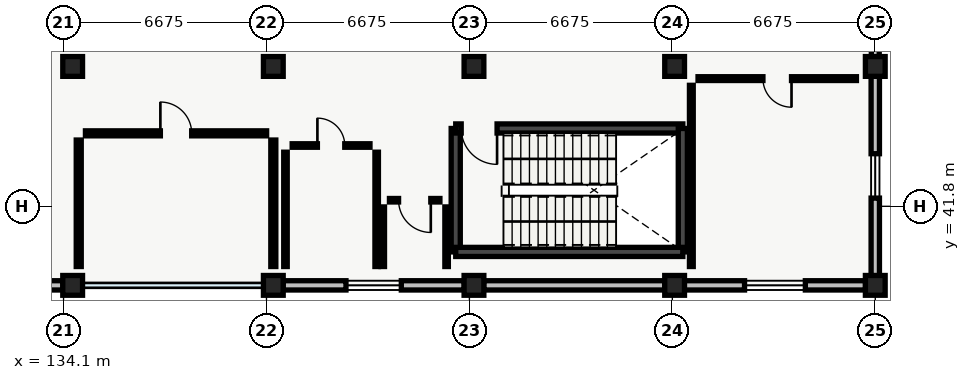
"""IFC4 building model, lengths in metres.
Left out: names, types, materials, properties, quantities, classifications, styles, units other than length and angle.
Written with IfcOpenShell. Run it as: python <this file> out.ifc"""

import sys

from ifc_helpers import new_model, si_unit, direction, frame, frame_2d, origin, origin_2d, place, context, subcontext, project, spatial, rectangle, extrude, element, fill, save


model = new_model("IFC4")
c1 = context("Model", 3, precision=1e-05, world=origin(), true_north=direction((0.0, 1.0)))
c2 = subcontext(c1, "Body", "Model", "MODEL_VIEW")
j1 = project(units=[si_unit("LENGTHUNIT", "METRE"), si_unit("PLANEANGLEUNIT", "RADIAN")], contexts=[c1])
p1 = place(None, origin())
s1 = spatial("IfcSite", under=j1, at=p1, CompositionType="ELEMENT")
p2 = place(p1, origin())
s2 = spatial("IfcBuilding", under=s1, at=p2, CompositionType="ELEMENT")
p3 = place(p2, frame((0.0, 0.0, 14.1)))
s3 = spatial("IfcBuildingStorey", under=s2, at=p3, CompositionType="ELEMENT", Elevation=14.1)
for number, where, z_axis, x_axis in (
    (1, (134.4, 39.2, 0.0), (0.0, 0.0, 1.0), (1.0, 0.0, 0.0)),
    (2, (134.4, 46.4, 0.0), (0.0, 0.0, 1.0), (1.0, 0.0, 0.0)),
    (3, (141.0, 39.2, 0.0), (0.0, 0.0, 1.0), (1.0, 0.0, 0.0)),
    (4, (141.0, 46.4, 0.0), (0.0, 0.0, 1.0), (1.0, 0.0, 0.0)),
    (5, (147.6, 39.2, 0.0), (0.0, 0.0, 1.0), (1.0, 0.0, 0.0)),
    (6, (147.6, 46.4, 0.0), (0.0, 0.0, 1.0), (1.0, 0.0, 0.0)),
    (7, (154.2, 39.2, 0.0), (0.0, 0.0, 1.0), (1.0, 0.0, 0.0)),
    (8, (154.2, 46.4, 0.0), (0.0, 0.0, 1.0), (1.0, 0.0, 0.0)),
    (9, (160.8, 39.2, 0.0), (0.0, 0.0, 1.0), (1.0, 0.0, 0.0)),
    (10, (160.8, 46.4, 0.0), (0.0, 0.0, 1.0), (1.0, 0.0, 0.0)),
):
    element("IfcColumn", number, at=place(p3, frame(where, z_axis=z_axis, x_axis=x_axis)), inside=s3, PredefinedType="COLUMN", context=c2, shape_type="SweptSolid", body=[
        extrude(rectangle(XDim=0.65, YDim=0.65, at=origin_2d()), origin(), (0.0, 0.0, 1.0), 4.29),
    ])
p4 = place(p3, frame((160.8, 53.28, 0.0), z_axis=(0.0, 0.0, 1.0), x_axis=(0.0, -1.0, 0.0)))
e11 = element("IfcWall", 11, at=p4, inside=s3, PredefinedType="STANDARD", context=c2, shape_type="SweptSolid", body=[
    extrude(rectangle(XDim=6.56, YDim=0.26, at=frame_2d((3.28, 0.0))), origin(), (0.0, 0.0, 1.0), 3.775),
])
p5 = place(p4, frame((2.505, 0.0, 0.95)))
e12 = element("IfcOpeningElement", 12, at=p5, cuts=e11, PredefinedType="OPENING", context=c2, shape_type="SweptSolid", body=[
    extrude(rectangle(XDim=1.55, YDim=1.46, at=frame_2d((0.775, 0.73))), frame((0.0, 0.13, 0.0), z_axis=(0.0, -1.0, 0.0), x_axis=(1.0, 0.0, 0.0)), (0.0, 0.0, 1.0), 0.26),
])
p6 = place(p3, frame((160.8, 46.08, 0.0), z_axis=(0.0, 0.0, 1.0), x_axis=(0.0, -1.0, 0.0)))
e13 = element("IfcWall", 13, at=p6, inside=s3, PredefinedType="STANDARD", context=c2, shape_type="SweptSolid", body=[
    extrude(rectangle(XDim=6.56, YDim=0.275, at=frame_2d((3.28, 0.0))), origin(), (0.0, 0.0, 1.0), 3.775),
])
p7 = place(p6, frame((2.55, 0.0, 0.95)))
e14 = element("IfcOpeningElement", 14, at=p7, cuts=e13, PredefinedType="OPENING", context=c2, shape_type="SweptSolid", body=[
    extrude(rectangle(XDim=1.46, YDim=1.44, at=frame_2d((0.73, 0.72))), frame((0.0, 0.137, 0.0), z_axis=(0.0, -1.0, 0.0), x_axis=(1.0, 0.0, 0.0)), (0.0, 0.0, 1.0), 0.275),
])
p8 = place(p3, frame((160.48, 39.2, 0.0), z_axis=(0.0, 0.0, 1.0), x_axis=(-1.0, 0.0, 0.0)))
e15 = element("IfcWall", 15, at=p8, inside=s3, PredefinedType="STANDARD", context=c2, shape_type="SweptSolid", body=[
    extrude(rectangle(XDim=5.96, YDim=0.305, at=frame_2d((2.98, 0.0))), origin(), (0.0, 0.0, 1.0), 3.775),
])
p9 = place(p8, frame((1.98, 0.0, 0.95)))
e16 = element("IfcOpeningElement", 16, at=p9, cuts=e15, PredefinedType="OPENING", context=c2, shape_type="SweptSolid", body=[
    extrude(rectangle(XDim=2.0, YDim=1.42, at=frame_2d((1.0, 0.71))), frame((0.0, 0.152, 0.0), z_axis=(0.0, -1.0, 0.0), x_axis=(1.0, 0.0, 0.0)), (0.0, 0.0, 1.0), 0.305),
])
p10 = place(p3, frame((153.88, 39.2, 0.0), z_axis=(0.0, 0.0, 1.0), x_axis=(-1.0, 0.0, 0.0)))
e17 = element("IfcWall", 17, at=p10, inside=s3, PredefinedType="STANDARD", context=c2, shape_type="SweptSolid", body=[
    extrude(rectangle(XDim=5.96, YDim=0.305, at=frame_2d((2.98, 0.0))), origin(), (0.0, 0.0, 1.0), 3.775),
])
p11 = place(p3, frame((147.28, 39.2, 0.0), z_axis=(0.0, 0.0, 1.0), x_axis=(-1.0, 0.0, 0.0)))
e18 = element("IfcWall", 18, at=p11, inside=s3, PredefinedType="STANDARD", context=c2, shape_type="SweptSolid", body=[
    extrude(rectangle(XDim=5.96, YDim=0.305, at=frame_2d((2.98, 0.0))), origin(), (0.0, 0.0, 1.0), 3.775),
])
p12 = place(p11, frame((2.07, 0.0, 0.95)))
e19 = element("IfcOpeningElement", 19, at=p12, cuts=e18, PredefinedType="OPENING", context=c2, shape_type="SweptSolid", body=[
    extrude(rectangle(XDim=1.82, YDim=1.38, at=frame_2d((0.91, 0.69))), frame((0.0, 0.152, 0.0), z_axis=(0.0, -1.0, 0.0), x_axis=(1.0, 0.0, 0.0)), (0.0, 0.0, 1.0), 0.305),
])
p13 = place(p3, frame((134.08, 39.2, 0.0), z_axis=(0.0, 0.0, 1.0), x_axis=(-1.0, 0.0, 0.0)))
e20 = element("IfcWall", 20, at=p13, inside=s3, PredefinedType="STANDARD", context=c2, shape_type="SweptSolid", body=[
    extrude(rectangle(XDim=5.96, YDim=0.305, at=frame_2d((2.98, 0.0))), origin(), (0.0, 0.0, 1.0), 3.775),
])
p14 = place(p13, frame((2.16, 0.0, 0.95)))
e21 = element("IfcOpeningElement", 21, at=p14, cuts=e20, PredefinedType="OPENING", context=c2, shape_type="SweptSolid", body=[
    extrude(rectangle(XDim=1.64, YDim=1.48, at=frame_2d((0.82, 0.74))), frame((0.0, 0.152, 0.0), z_axis=(0.0, -1.0, 0.0), x_axis=(1.0, 0.0, 0.0)), (0.0, 0.0, 1.0), 0.305),
])
p15 = place(p3, frame((147.0, 40.3, 0.0), z_axis=(0.0, 0.0, 1.0), x_axis=(0.0, 1.0, 0.0)))
e22 = element("IfcWall", 22, at=p15, inside=s3, PredefinedType="SHEAR", context=c2, shape_type="SweptSolid", body=[
    extrude(rectangle(XDim=4.06, YDim=0.3, at=frame_2d((2.03, 0.0))), origin(), (0.0, 0.0, 1.0), 4.28),
])
p16 = place(p3, frame((147.0, 44.36, 0.0), z_axis=(0.0, 0.0, 1.0), x_axis=(1.0, 0.0, 0.0)))
e23 = element("IfcWall", 23, at=p16, inside=s3, PredefinedType="SHEAR", context=c2, shape_type="SweptSolid", body=[
    extrude(rectangle(XDim=7.47, YDim=0.3, at=frame_2d((3.735, 0.0))), origin(), (0.0, 0.0, 1.0), 4.28),
])
p17 = place(p16, frame((0.18, 0.0, 0.0)))
e24 = element("IfcOpeningElement", 24, at=p17, cuts=e23, PredefinedType="OPENING", context=c2, shape_type="SweptSolid", body=[
    extrude(rectangle(XDim=1.18, YDim=2.15, at=frame_2d((0.59, 1.075))), frame((0.0, 0.15, 0.0), z_axis=(0.0, -1.0, 0.0), x_axis=(1.0, 0.0, 0.0)), (0.0, 0.0, 1.0), 0.3),
])
p18 = place(p3, frame((154.47, 44.36, 0.0), z_axis=(0.0, 0.0, 1.0), x_axis=(0.0, -1.0, 0.0)))
e25 = element("IfcWall", 25, at=p18, inside=s3, PredefinedType="SHEAR", context=c2, shape_type="SweptSolid", body=[
    extrude(rectangle(XDim=4.06, YDim=0.3, at=frame_2d((2.03, 0.0))), origin(), (0.0, 0.0, 1.0), 4.28),
])
p19 = place(p3, frame((154.47, 40.3, 0.0), z_axis=(0.0, 0.0, 1.0), x_axis=(-1.0, 0.0, 0.0)))
e26 = element("IfcWall", 26, at=p19, inside=s3, PredefinedType="SHEAR", context=c2, shape_type="SweptSolid", body=[
    extrude(rectangle(XDim=7.47, YDim=0.3, at=frame_2d((3.735, 0.0))), origin(), (0.0, 0.0, 1.0), 4.28),
])
p20 = place(p3, frame((144.4, 39.82, 0.0), z_axis=(0.0, 0.0, 1.0), x_axis=(0.0, 1.0, 0.0)))
e27 = element("IfcWall", 27, at=p20, inside=s3, PredefinedType="PARTITIONING", context=c2, shape_type="SweptSolid", body=[
    extrude(rectangle(XDim=3.76, YDim=0.115, at=frame_2d((1.88, 0.0))), origin(), (0.0, 0.0, 1.0), 3.95),
])
p21 = place(p3, frame((144.18, 43.8, 0.0), z_axis=(0.0, 0.0, 1.0), x_axis=(-1.0, 0.0, 0.0)))
e28 = element("IfcWall", 28, at=p21, inside=s3, PredefinedType="PARTITIONING", context=c2, shape_type="SweptSolid", body=[
    extrude(rectangle(XDim=2.56, YDim=0.115, at=frame_2d((1.28, 0.0))), origin(), (0.0, 0.0, 1.0), 3.95),
])
p22 = place(p21, frame((0.83, 0.0, 0.0)))
e29 = element("IfcOpeningElement", 29, at=p22, cuts=e28, PredefinedType="OPENING", context=c2, shape_type="SweptSolid", body=[
    extrude(rectangle(XDim=0.9, YDim=2.1, at=frame_2d((0.45, 1.05))), frame((0.0, 0.058, 0.0), z_axis=(0.0, -1.0, 0.0), x_axis=(1.0, 0.0, 0.0)), (0.0, 0.0, 1.0), 0.115),
])
p23 = place(p3, frame((141.4, 43.58, 0.0), z_axis=(0.0, 0.0, 1.0), x_axis=(0.0, -1.0, 0.0)))
e30 = element("IfcWall", 30, at=p23, inside=s3, PredefinedType="PARTITIONING", context=c2, shape_type="SweptSolid", body=[
    extrude(rectangle(XDim=3.76, YDim=0.115, at=frame_2d((1.88, 0.0))), origin(), (0.0, 0.0, 1.0), 3.95),
])
p24 = place(p3, frame((146.7, 39.82, 0.0), z_axis=(0.0, 0.0, 1.0), x_axis=(0.0, 1.0, 0.0)))
e31 = element("IfcWall", 31, at=p24, inside=s3, PredefinedType="PARTITIONING", context=c2, shape_type="SweptSolid", body=[
    extrude(rectangle(XDim=1.96, YDim=0.115, at=frame_2d((0.98, 0.0))), origin(), (0.0, 0.0, 1.0), 3.95),
])
p25 = place(p3, frame((146.48, 42.0, 0.0), z_axis=(0.0, 0.0, 1.0), x_axis=(-1.0, 0.0, 0.0)))
e32 = element("IfcWall", 32, at=p25, inside=s3, PredefinedType="PARTITIONING", context=c2, shape_type="SweptSolid", body=[
    extrude(rectangle(XDim=1.66, YDim=0.115, at=frame_2d((0.83, 0.0))), origin(), (0.0, 0.0, 1.0), 3.95),
])
p26 = place(p25, frame((0.3, 0.0, 0.0)))
e33 = element("IfcOpeningElement", 33, at=p26, cuts=e32, PredefinedType="OPENING", context=c2, shape_type="SweptSolid", body=[
    extrude(rectangle(XDim=1.06, YDim=2.12, at=frame_2d((0.53, 1.06))), frame((0.0, 0.058, 0.0), z_axis=(0.0, -1.0, 0.0), x_axis=(1.0, 0.0, 0.0)), (0.0, 0.0, 1.0), 0.115),
])
p27 = place(p3, frame((144.6, 41.78, 0.0), z_axis=(0.0, 0.0, 1.0), x_axis=(0.0, -1.0, 0.0)))
e34 = element("IfcWall", 34, at=p27, inside=s3, PredefinedType="PARTITIONING", context=c2, shape_type="SweptSolid", body=[
    extrude(rectangle(XDim=1.96, YDim=0.115, at=frame_2d((0.98, 0.0))), origin(), (0.0, 0.0, 1.0), 3.95),
])
p28 = place(p3, frame((141.0, 39.82, 0.0), z_axis=(0.0, 0.0, 1.0), x_axis=(0.0, 1.0, 0.0)))
e35 = element("IfcWall", 35, at=p28, inside=s3, PredefinedType="PARTITIONING", context=c2, shape_type="SweptSolid", body=[
    extrude(rectangle(XDim=4.16, YDim=0.165, at=frame_2d((2.08, 0.0))), origin(), (0.0, 0.0, 1.0), 3.675),
])
p29 = place(p3, frame((140.78, 44.2, 0.0), z_axis=(0.0, 0.0, 1.0), x_axis=(-1.0, 0.0, 0.0)))
e36 = element("IfcWall", 36, at=p29, inside=s3, PredefinedType="PARTITIONING", context=c2, shape_type="SweptSolid", body=[
    extrude(rectangle(XDim=5.96, YDim=0.165, at=frame_2d((2.98, 0.0))), origin(), (0.0, 0.0, 1.0), 3.875),
])
p30 = place(p29, frame((2.465, 0.0, 0.0)))
e37 = element("IfcOpeningElement", 37, at=p30, cuts=e36, PredefinedType="OPENING", context=c2, shape_type="SweptSolid", body=[
    extrude(rectangle(XDim=1.03, YDim=2.16, at=frame_2d((0.515, 1.08))), frame((0.0, 0.083, 0.0), z_axis=(0.0, -1.0, 0.0), x_axis=(1.0, 0.0, 0.0)), (0.0, 0.0, 1.0), 0.165),
])
p31 = place(p3, frame((134.6, 43.98, 0.0), z_axis=(0.0, 0.0, 1.0), x_axis=(0.0, -1.0, 0.0)))
e38 = element("IfcWall", 38, at=p31, inside=s3, PredefinedType="PARTITIONING", context=c2, shape_type="SweptSolid", body=[
    extrude(rectangle(XDim=4.16, YDim=0.165, at=frame_2d((2.08, 0.0))), origin(), (0.0, 0.0, 1.0), 3.675),
])
p32 = place(p3, frame((160.18, 46.0, 0.0), z_axis=(0.0, 0.0, 1.0), x_axis=(-1.0, 0.0, 0.0)))
e39 = element("IfcWall", 39, at=p32, inside=s3, PredefinedType="PARTITIONING", context=c2, shape_type="SweptSolid", body=[
    extrude(rectangle(XDim=5.21, YDim=0.125, at=frame_2d((2.605, 0.0))), origin(), (0.0, 0.0, 1.0), 3.95),
])
p33 = place(p32, frame((2.135, 0.0, 0.0)))
e40 = element("IfcOpeningElement", 40, at=p33, cuts=e39, PredefinedType="OPENING", context=c2, shape_type="SweptSolid", body=[
    extrude(rectangle(XDim=0.94, YDim=2.12, at=frame_2d((0.47, 1.06))), frame((0.0, 0.062, 0.0), z_axis=(0.0, -1.0, 0.0), x_axis=(1.0, 0.0, 0.0)), (0.0, 0.0, 1.0), 0.125),
])
p34 = place(p3, frame((154.75, 45.78, 0.0), z_axis=(0.0, 0.0, 1.0), x_axis=(0.0, -1.0, 0.0)))
e41 = element("IfcWall", 41, at=p34, inside=s3, PredefinedType="PARTITIONING", context=c2, shape_type="SweptSolid", body=[
    extrude(rectangle(XDim=5.96, YDim=0.125, at=frame_2d((2.98, 0.0))), origin(), (0.0, 0.0, 1.0), 3.95),
])
p35 = place(p7, origin())
e42 = element("IfcWindow", 42, at=p35, inside=s3, PartitioningType="SINGLE_PANEL", PredefinedType="WINDOW", context=c2, shape_type="SweptSolid", body=[
    extrude(rectangle(XDim=1.46, YDim=1.44, at=frame_2d((0.73, 0.72))), frame((0.0, 0.03, 0.0), z_axis=(0.0, -1.0, 0.0), x_axis=(1.0, 0.0, 0.0)), (0.0, 0.0, 1.0), 0.06),
])
fill(e14, e42)
p36 = place(p9, origin())
e43 = element("IfcWindow", 43, at=p36, inside=s3, PartitioningType="SINGLE_PANEL", PredefinedType="WINDOW", context=c2, shape_type="SweptSolid", body=[
    extrude(rectangle(XDim=2.0, YDim=1.42, at=frame_2d((1.0, 0.71))), frame((0.0, 0.03, 0.0), z_axis=(0.0, -1.0, 0.0), x_axis=(1.0, 0.0, 0.0)), (0.0, 0.0, 1.0), 0.06),
])
fill(e16, e43)
p37 = place(p12, origin())
e44 = element("IfcWindow", 44, at=p37, inside=s3, PartitioningType="SINGLE_PANEL", PredefinedType="WINDOW", context=c2, shape_type="SweptSolid", body=[
    extrude(rectangle(XDim=1.82, YDim=1.38, at=frame_2d((0.91, 0.69))), frame((0.0, 0.03, 0.0), z_axis=(0.0, -1.0, 0.0), x_axis=(1.0, 0.0, 0.0)), (0.0, 0.0, 1.0), 0.06),
])
fill(e19, e44)
p38 = place(p17, origin())
e45 = element("IfcDoor", 45, at=p38, inside=s3, OperationType="SINGLE_SWING_RIGHT", PredefinedType="DOOR", context=c2, shape_type="SweptSolid", body=[
    extrude(rectangle(XDim=1.18, YDim=2.15, at=frame_2d((0.59, 1.075))), frame((0.0, 0.025, 0.0), z_axis=(0.0, -1.0, 0.0), x_axis=(1.0, 0.0, 0.0)), (0.0, 0.0, 1.0), 0.05),
])
fill(e24, e45)
p39 = place(p22, origin())
e46 = element("IfcDoor", 46, at=p39, inside=s3, OperationType="SINGLE_SWING_RIGHT", PredefinedType="DOOR", context=c2, shape_type="SweptSolid", body=[
    extrude(rectangle(XDim=0.9, YDim=2.1, at=frame_2d((0.45, 1.05))), frame((0.0, 0.025, 0.0), z_axis=(0.0, -1.0, 0.0), x_axis=(1.0, 0.0, 0.0)), (0.0, 0.0, 1.0), 0.05),
])
fill(e29, e46)
p40 = place(p26, origin())
e47 = element("IfcDoor", 47, at=p40, inside=s3, OperationType="SINGLE_SWING_LEFT", PredefinedType="DOOR", context=c2, shape_type="SweptSolid", body=[
    extrude(rectangle(XDim=1.06, YDim=2.12, at=frame_2d((0.53, 1.06))), frame((0.0, 0.025, 0.0), z_axis=(0.0, -1.0, 0.0), x_axis=(1.0, 0.0, 0.0)), (0.0, 0.0, 1.0), 0.05),
])
fill(e33, e47)
p41 = place(p30, origin())
e48 = element("IfcDoor", 48, at=p41, inside=s3, OperationType="SINGLE_SWING_RIGHT", PredefinedType="DOOR", context=c2, shape_type="SweptSolid", body=[
    extrude(rectangle(XDim=1.03, YDim=2.16, at=frame_2d((0.515, 1.08))), frame((0.0, 0.025, 0.0), z_axis=(0.0, -1.0, 0.0), x_axis=(1.0, 0.0, 0.0)), (0.0, 0.0, 1.0), 0.05),
])
fill(e37, e48)
p42 = place(p33, origin())
e49 = element("IfcDoor", 49, at=p42, inside=s3, OperationType="SINGLE_SWING_LEFT", PredefinedType="DOOR", context=c2, shape_type="SweptSolid", body=[
    extrude(rectangle(XDim=0.94, YDim=2.12, at=frame_2d((0.47, 1.06))), frame((0.0, 0.025, 0.0), z_axis=(0.0, -1.0, 0.0), x_axis=(1.0, 0.0, 0.0)), (0.0, 0.0, 1.0), 0.05),
])
fill(e40, e49)
save(model, sys.argv[1])
